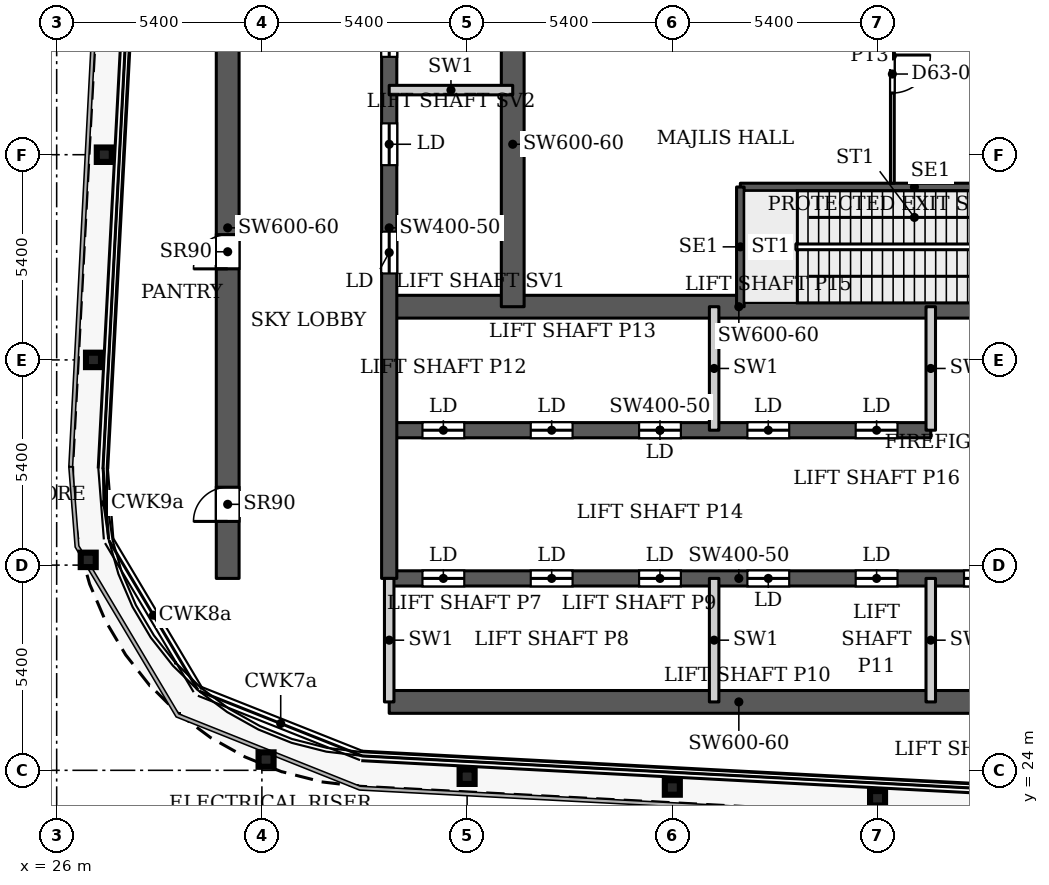
"""IFC4 building model, lengths in metres.
Left out: names, types, materials, properties, quantities, classifications, styles, units other than length and angle.
Written with IfcOpenShell. Run it as: python <this file> out.ifc"""

import sys

from ifc_helpers import new_model, si_unit, direction, frame, frame_2d, origin, origin_2d, place, context, subcontext, project, spatial, rectangle, i_section, extrude, source, transform, mapped, element, fill, save


model = new_model("IFC4")
c1 = context("Model", 3, precision=1e-05, world=origin(), true_north=direction((0.0, 1.0)))
c2 = subcontext(c1, "Body", "Model", "MODEL_VIEW")
j1 = project(units=[si_unit("LENGTHUNIT", "METRE"), si_unit("PLANEANGLEUNIT", "RADIAN")], contexts=[c1])
p1 = place(None, origin())
s1 = spatial("IfcSite", under=j1, at=p1, CompositionType="ELEMENT")
p2 = place(p1, origin())
s2 = spatial("IfcBuilding", under=s1, at=p2, CompositionType="ELEMENT")
p3 = place(p2, frame((0.0, 0.0, 266.9)))
s3 = spatial("IfcBuildingStorey", under=s2, at=p3, CompositionType="ELEMENT", Elevation=266.9)
for number, where, z_axis, x_axis in (
    (1, (47.6, 23.264, 0.0), (0.0, 0.0, 1.0), (1.0, 0.0, 0.0)),
    (2, (42.2, 23.548, 0.0), (0.0, 0.0, 1.0), (1.0, 0.0, 0.0)),
    (3, (36.8, 23.832, 0.0), (0.0, 0.0, 1.0), (1.0, 0.0, 0.0)),
    (4, (31.51, 24.283, 0.0), (0.0, 0.0, 1.0), (1.0, 0.0, 0.0)),
    (5, (26.83, 29.538, 0.0), (0.0, 0.0, 1.0), (1.0, 0.0, 0.0)),
    (6, (26.969, 34.8, 0.0), (0.0, 0.0, 1.0), (1.0, 0.0, 0.0)),
    (7, (27.253, 40.2, 0.0), (0.0, 0.0, 1.0), (1.0, 0.0, 0.0)),
):
    element("IfcColumn", number, at=place(p3, frame(where, z_axis=z_axis, x_axis=x_axis)), inside=s3, PredefinedType="COLUMN", context=c2, shape_type="SweptSolid", body=[
        extrude(i_section(OverallWidth=0.395, OverallDepth=0.38, WebThickness=0.019, FlangeThickness=0.03, FilletRadius=0.011, at=origin_2d()), origin(), (0.0, 0.0, 1.0), 7.8),
    ])
p4 = place(p3, frame((34.75, 25.8, 0.0), z_axis=(0.0, 0.0, 1.0), x_axis=(1.0, 0.0, 0.0)))
e8 = element("IfcWall", 8, at=p4, inside=s3, PredefinedType="SHEAR", context=c2, shape_type="SweptSolid", body=[
    extrude(rectangle(XDim=18.4, YDim=0.6, at=frame_2d((9.2, 0.0))), origin(), (0.0, 0.0, 1.0), 7.8),
])
p5 = place(p3, frame((34.75, 29.05, 0.0), z_axis=(0.0, 0.0, 1.0), x_axis=(1.0, 0.0, 0.0)))
e9 = element("IfcWall", 9, at=p5, inside=s3, PredefinedType="SHEAR", context=c2, shape_type="SweptSolid", body=[
    extrude(rectangle(XDim=18.4, YDim=0.4, at=frame_2d((9.2, 0.0))), origin(), (0.0, 0.0, 1.0), 7.8),
])
p6 = place(p5, frame((0.875, 0.0, 0.0)))
e10 = element("IfcOpeningElement", 10, at=p6, cuts=e9, PredefinedType="OPENING", context=c2, shape_type="SweptSolid", body=[
    extrude(rectangle(XDim=1.1, YDim=2.2, at=frame_2d((0.55, 1.1))), frame((0.0, 0.21, 0.0), z_axis=(0.0, -1.0, 0.0), x_axis=(1.0, 0.0, 0.0)), (0.0, 0.0, 1.0), 0.42),
])
p7 = place(p5, frame((3.725, 0.0, 0.0)))
e11 = element("IfcOpeningElement", 11, at=p7, cuts=e9, PredefinedType="OPENING", context=c2, shape_type="SweptSolid", body=[
    extrude(rectangle(XDim=1.1, YDim=2.2, at=frame_2d((0.55, 1.1))), frame((0.0, 0.21, 0.0), z_axis=(0.0, -1.0, 0.0), x_axis=(1.0, 0.0, 0.0)), (0.0, 0.0, 1.0), 0.42),
])
p8 = place(p5, frame((6.575, 0.0, 0.0)))
e12 = element("IfcOpeningElement", 12, at=p8, cuts=e9, PredefinedType="OPENING", context=c2, shape_type="SweptSolid", body=[
    extrude(rectangle(XDim=1.1, YDim=2.2, at=frame_2d((0.55, 1.1))), frame((0.0, 0.21, 0.0), z_axis=(0.0, -1.0, 0.0), x_axis=(1.0, 0.0, 0.0)), (0.0, 0.0, 1.0), 0.42),
])
p9 = place(p5, frame((9.425, 0.0, 0.0)))
e13 = element("IfcOpeningElement", 13, at=p9, cuts=e9, PredefinedType="OPENING", context=c2, shape_type="SweptSolid", body=[
    extrude(rectangle(XDim=1.1, YDim=2.2, at=frame_2d((0.55, 1.1))), frame((0.0, 0.21, 0.0), z_axis=(0.0, -1.0, 0.0), x_axis=(1.0, 0.0, 0.0)), (0.0, 0.0, 1.0), 0.42),
])
p10 = place(p5, frame((12.275, 0.0, 0.0)))
e14 = element("IfcOpeningElement", 14, at=p10, cuts=e9, PredefinedType="OPENING", context=c2, shape_type="SweptSolid", body=[
    extrude(rectangle(XDim=1.1, YDim=2.2, at=frame_2d((0.55, 1.1))), frame((0.0, 0.21, 0.0), z_axis=(0.0, -1.0, 0.0), x_axis=(1.0, 0.0, 0.0)), (0.0, 0.0, 1.0), 0.42),
])
p11 = place(p5, frame((15.125, 0.0, 0.0)))
e15 = element("IfcOpeningElement", 15, at=p11, cuts=e9, PredefinedType="OPENING", context=c2, shape_type="SweptSolid", body=[
    extrude(rectangle(XDim=1.1, YDim=2.2, at=frame_2d((0.55, 1.1))), frame((0.0, 0.21, 0.0), z_axis=(0.0, -1.0, 0.0), x_axis=(1.0, 0.0, 0.0)), (0.0, 0.0, 1.0), 0.42),
])
p12 = place(p3, frame((34.75, 32.95, 0.0), z_axis=(0.0, 0.0, 1.0), x_axis=(1.0, 0.0, 0.0)))
e16 = element("IfcWall", 16, at=p12, inside=s3, PredefinedType="SHEAR", context=c2, shape_type="SweptSolid", body=[
    extrude(rectangle(XDim=14.25, YDim=0.4, at=frame_2d((7.125, 0.0))), origin(), (0.0, 0.0, 1.0), 7.8),
])
p13 = place(p12, frame((0.875, 0.0, 0.0)))
e17 = element("IfcOpeningElement", 17, at=p13, cuts=e16, PredefinedType="OPENING", context=c2, shape_type="SweptSolid", body=[
    extrude(rectangle(XDim=1.1, YDim=2.2, at=frame_2d((0.55, 1.1))), frame((0.0, 0.21, 0.0), z_axis=(0.0, -1.0, 0.0), x_axis=(1.0, 0.0, 0.0)), (0.0, 0.0, 1.0), 0.42),
])
p14 = place(p12, frame((3.725, 0.0, 0.0)))
e18 = element("IfcOpeningElement", 18, at=p14, cuts=e16, PredefinedType="OPENING", context=c2, shape_type="SweptSolid", body=[
    extrude(rectangle(XDim=1.1, YDim=2.2, at=frame_2d((0.55, 1.1))), frame((0.0, 0.21, 0.0), z_axis=(0.0, -1.0, 0.0), x_axis=(1.0, 0.0, 0.0)), (0.0, 0.0, 1.0), 0.42),
])
p15 = place(p12, frame((6.575, 0.0, 0.0)))
e19 = element("IfcOpeningElement", 19, at=p15, cuts=e16, PredefinedType="OPENING", context=c2, shape_type="SweptSolid", body=[
    extrude(rectangle(XDim=1.1, YDim=2.2, at=frame_2d((0.55, 1.1))), frame((0.0, 0.21, 0.0), z_axis=(0.0, -1.0, 0.0), x_axis=(1.0, 0.0, 0.0)), (0.0, 0.0, 1.0), 0.42),
])
p16 = place(p12, frame((9.425, 0.0, 0.0)))
e20 = element("IfcOpeningElement", 20, at=p16, cuts=e16, PredefinedType="OPENING", context=c2, shape_type="SweptSolid", body=[
    extrude(rectangle(XDim=1.1, YDim=2.2, at=frame_2d((0.55, 1.1))), frame((0.0, 0.21, 0.0), z_axis=(0.0, -1.0, 0.0), x_axis=(1.0, 0.0, 0.0)), (0.0, 0.0, 1.0), 0.42),
])
p17 = place(p12, frame((12.275, 0.0, 0.0)))
e21 = element("IfcOpeningElement", 21, at=p17, cuts=e16, PredefinedType="OPENING", context=c2, shape_type="SweptSolid", body=[
    extrude(rectangle(XDim=1.1, YDim=2.2, at=frame_2d((0.55, 1.1))), frame((0.0, 0.21, 0.0), z_axis=(0.0, -1.0, 0.0), x_axis=(1.0, 0.0, 0.0)), (0.0, 0.0, 1.0), 0.42),
])
p18 = place(p3, frame((34.75, 36.2, 0.0), z_axis=(0.0, 0.0, 1.0), x_axis=(1.0, 0.0, 0.0)))
e22 = element("IfcWall", 22, at=p18, inside=s3, PredefinedType="SHEAR", context=c2, shape_type="SweptSolid", body=[
    extrude(rectangle(XDim=18.4, YDim=0.6, at=frame_2d((9.2, 0.0))), origin(), (0.0, 0.0, 1.0), 7.8),
])
p19 = place(p18, frame((16.9, 0.0, 0.0)))
e23 = element("IfcOpeningElement", 23, at=p19, cuts=e22, PredefinedType="OPENING", context=c2, shape_type="SweptSolid", body=[
    extrude(rectangle(XDim=1.0, YDim=2.2, at=frame_2d((0.5, 1.1))), frame((0.0, 0.31, 0.0), z_axis=(0.0, -1.0, 0.0), x_axis=(1.0, 0.0, 0.0)), (0.0, 0.0, 1.0), 0.62),
])
p20 = place(p3, frame((34.75, 29.05, 0.0), z_axis=(0.0, 0.0, 1.0), x_axis=(0.0, 1.0, 0.0)))
e24 = element("IfcWall", 24, at=p20, inside=s3, PredefinedType="SHEAR", context=c2, shape_type="SweptSolid", body=[
    extrude(rectangle(XDim=18.45, YDim=0.4, at=frame_2d((9.225, 0.0))), origin(), (0.0, 0.0, 1.0), 7.8),
])
p21 = place(p20, frame((8.025, 0.0, 0.0)))
e25 = element("IfcOpeningElement", 25, at=p21, cuts=e24, PredefinedType="OPENING", context=c2, shape_type="SweptSolid", body=[
    extrude(rectangle(XDim=1.1, YDim=2.2, at=frame_2d((0.55, 1.1))), frame((0.0, 0.21, 0.0), z_axis=(0.0, -1.0, 0.0), x_axis=(1.0, 0.0, 0.0)), (0.0, 0.0, 1.0), 0.42),
])
p22 = place(p20, frame((10.875, 0.0, 0.0)))
e26 = element("IfcOpeningElement", 26, at=p22, cuts=e24, PredefinedType="OPENING", context=c2, shape_type="SweptSolid", body=[
    extrude(rectangle(XDim=1.1, YDim=2.2, at=frame_2d((0.55, 1.1))), frame((0.0, 0.21, 0.0), z_axis=(0.0, -1.0, 0.0), x_axis=(1.0, 0.0, 0.0)), (0.0, 0.0, 1.0), 0.42),
])
p23 = place(p20, frame((13.725, 0.0, 0.0)))
e27 = element("IfcOpeningElement", 27, at=p23, cuts=e24, PredefinedType="OPENING", context=c2, shape_type="SweptSolid", body=[
    extrude(rectangle(XDim=1.1, YDim=2.2, at=frame_2d((0.55, 1.1))), frame((0.0, 0.21, 0.0), z_axis=(0.0, -1.0, 0.0), x_axis=(1.0, 0.0, 0.0)), (0.0, 0.0, 1.0), 0.42),
])
p24 = place(p20, frame((15.95, 0.0, 0.0)))
e28 = element("IfcOpeningElement", 28, at=p24, cuts=e24, PredefinedType="OPENING", context=c2, shape_type="SweptSolid", body=[
    extrude(rectangle(XDim=1.1, YDim=2.2, at=frame_2d((0.55, 1.1))), frame((0.0, 0.21, 0.0), z_axis=(0.0, -1.0, 0.0), x_axis=(1.0, 0.0, 0.0)), (0.0, 0.0, 1.0), 0.42),
])
p25 = place(p3, frame((38.0, 36.2, 0.0), z_axis=(0.0, 0.0, 1.0), x_axis=(0.0, 1.0, 0.0)))
e29 = element("IfcWall", 29, at=p25, inside=s3, PredefinedType="SHEAR", context=c2, shape_type="SweptSolid", body=[
    extrude(rectangle(XDim=8.55, YDim=0.6, at=frame_2d((4.275, 0.0))), origin(), (0.0, 0.0, 1.0), 7.8),
])
p26 = place(p3, frame((30.5, 29.05, 0.0), z_axis=(0.0, 0.0, 1.0), x_axis=(0.0, 1.0, 0.0)))
e30 = element("IfcWall", 30, at=p26, inside=s3, PredefinedType="SHEAR", context=c2, shape_type="SweptSolid", body=[
    extrude(rectangle(XDim=18.45, YDim=0.6, at=frame_2d((9.225, 0.0))), origin(), (0.0, 0.0, 1.0), 7.8),
])
p27 = place(p26, frame((1.5, 0.0, 0.0)))
e31 = element("IfcOpeningElement", 31, at=p27, cuts=e30, PredefinedType="OPENING", context=c2, shape_type="SweptSolid", body=[
    extrude(rectangle(XDim=0.9, YDim=2.2, at=frame_2d((0.45, 1.1))), frame((0.0, 0.31, 0.0), z_axis=(0.0, -1.0, 0.0), x_axis=(1.0, 0.0, 0.0)), (0.0, 0.0, 1.0), 0.62),
])
p28 = place(p26, frame((8.146, 0.0, 0.0)))
e32 = element("IfcOpeningElement", 32, at=p28, cuts=e30, PredefinedType="OPENING", context=c2, shape_type="SweptSolid", body=[
    extrude(rectangle(XDim=0.9, YDim=2.2, at=frame_2d((0.45, 1.1))), frame((0.0, 0.31, 0.0), z_axis=(0.0, -1.0, 0.0), x_axis=(1.0, 0.0, 0.0)), (0.0, 0.0, 1.0), 0.62),
])
p29 = place(p3, frame((43.99, 39.35, 0.0), z_axis=(0.0, 0.0, 1.0), x_axis=(1.0, 0.0, 0.0)))
e33 = element("IfcWall", 33, at=p29, inside=s3, PredefinedType="SHEAR", context=c2, shape_type="SweptSolid", body=[
    extrude(rectangle(XDim=9.16, YDim=0.2, at=frame_2d((4.58, 0.0))), origin(), (0.0, 0.0, 1.0), 7.8),
])
p30 = place(p3, frame((43.99, 36.2, 0.0), z_axis=(0.0, 0.0, 1.0), x_axis=(0.0, 1.0, 0.0)))
e34 = element("IfcWall", 34, at=p30, inside=s3, PredefinedType="SHEAR", context=c2, shape_type="SweptSolid", body=[
    extrude(rectangle(XDim=3.15, YDim=0.2, at=frame_2d((1.575, 0.0))), origin(), (0.0, 0.0, 1.0), 7.8),
])
for number, where, z_axis, x_axis in (
    (35, (34.75, 25.8, 0.0), (0.0, 0.0, 1.0), (0.0, 1.0, 0.0)),
    (36, (43.3, 25.8, 0.0), (0.0, 0.0, 1.0), (0.0, 1.0, 0.0)),
    (37, (43.3, 32.95, 0.0), (0.0, 0.0, 1.0), (0.0, 1.0, 0.0)),
    (38, (49.0, 25.8, 0.0), (0.0, 0.0, 1.0), (0.0, 1.0, 0.0)),
    (39, (49.0, 32.95, 0.0), (0.0, 0.0, 1.0), (0.0, 1.0, 0.0)),
    (40, (34.75, 41.9, 0.0), (0.0, 0.0, 1.0), (1.0, 0.0, 0.0)),
):
    element("IfcWall", number, at=place(p3, frame(where, z_axis=z_axis, x_axis=x_axis)), inside=s3, PredefinedType="PARTITIONING", context=c2, shape_type="SweptSolid", body=[
        extrude(rectangle(XDim=3.25, YDim=0.25, at=frame_2d((1.625, 0.0))), origin(), (0.0, 0.0, 1.0), 7.8),
    ])
p31 = place(p3, frame((47.99, 39.449, 0.0), z_axis=(0.0, 0.0, 1.0), x_axis=(0.0, 1.0, 0.0)))
e41 = element("IfcWall", 41, at=p31, inside=s3, PredefinedType="PARTITIONING", context=c2, shape_type="SweptSolid", body=[
    extrude(rectangle(XDim=6.701, YDim=0.1, at=frame_2d((3.351, 0.0))), origin(), (0.0, 0.0, 1.0), 7.5),
])
p32 = place(p31, frame((2.374, 0.0, 0.0)))
e42 = element("IfcOpeningElement", 42, at=p32, cuts=e41, PredefinedType="OPENING", context=c2, shape_type="SweptSolid", body=[
    extrude(rectangle(XDim=1.0, YDim=2.1, at=frame_2d((0.5, 1.05))), frame((0.0, 0.06, 0.0), z_axis=(0.0, -1.0, 0.0), x_axis=(1.0, 0.0, 0.0)), (0.0, 0.0, 1.0), 0.12),
])
m1 = source(origin(), c2, "Body", "SweptSolid", [
    extrude(rectangle(XDim=1.1, YDim=2.2, at=frame_2d((0.55, 1.1))), frame((0.0, 0.025, 0.0), z_axis=(0.0, -1.0, 0.0), x_axis=(1.0, 0.0, 0.0)), (0.0, 0.0, 1.0), 0.05),
])
p33 = place(p6, origin())
e43 = element("IfcDoor", 43, at=p33, inside=s3, OperationType="SLIDING_TO_LEFT", PredefinedType="DOOR", context=c2, shape_type="MappedRepresentation", body=[
    mapped(m1, transform((0.0, 0.0, 0.0), x_axis=(1.0, 0.0, 0.0), y_axis=(0.0, 1.0, 0.0), z_axis=(0.0, 0.0, 1.0), scale=1.0)),
])
fill(e10, e43)
p34 = place(p7, origin())
e44 = element("IfcDoor", 44, at=p34, inside=s3, OperationType="SLIDING_TO_LEFT", PredefinedType="DOOR", context=c2, shape_type="MappedRepresentation", body=[
    mapped(m1, transform((0.0, 0.0, 0.0), x_axis=(1.0, 0.0, 0.0), y_axis=(0.0, 1.0, 0.0), z_axis=(0.0, 0.0, 1.0), scale=1.0)),
])
fill(e11, e44)
p35 = place(p8, origin())
e45 = element("IfcDoor", 45, at=p35, inside=s3, OperationType="SLIDING_TO_LEFT", PredefinedType="DOOR", context=c2, shape_type="MappedRepresentation", body=[
    mapped(m1, transform((0.0, 0.0, 0.0), x_axis=(1.0, 0.0, 0.0), y_axis=(0.0, 1.0, 0.0), z_axis=(0.0, 0.0, 1.0), scale=1.0)),
])
fill(e12, e45)
p36 = place(p9, origin())
e46 = element("IfcDoor", 46, at=p36, inside=s3, OperationType="SLIDING_TO_LEFT", PredefinedType="DOOR", context=c2, shape_type="MappedRepresentation", body=[
    mapped(m1, transform((0.0, 0.0, 0.0), x_axis=(1.0, 0.0, 0.0), y_axis=(0.0, 1.0, 0.0), z_axis=(0.0, 0.0, 1.0), scale=1.0)),
])
fill(e13, e46)
p37 = place(p10, origin())
e47 = element("IfcDoor", 47, at=p37, inside=s3, OperationType="SLIDING_TO_LEFT", PredefinedType="DOOR", context=c2, shape_type="MappedRepresentation", body=[
    mapped(m1, transform((0.0, 0.0, 0.0), x_axis=(1.0, 0.0, 0.0), y_axis=(0.0, 1.0, 0.0), z_axis=(0.0, 0.0, 1.0), scale=1.0)),
])
fill(e14, e47)
p38 = place(p13, origin())
e48 = element("IfcDoor", 48, at=p38, inside=s3, OperationType="SLIDING_TO_LEFT", PredefinedType="DOOR", context=c2, shape_type="MappedRepresentation", body=[
    mapped(m1, transform((0.0, 0.0, 0.0), x_axis=(1.0, 0.0, 0.0), y_axis=(0.0, 1.0, 0.0), z_axis=(0.0, 0.0, 1.0), scale=1.0)),
])
fill(e17, e48)
p39 = place(p14, origin())
e49 = element("IfcDoor", 49, at=p39, inside=s3, OperationType="SLIDING_TO_LEFT", PredefinedType="DOOR", context=c2, shape_type="MappedRepresentation", body=[
    mapped(m1, transform((0.0, 0.0, 0.0), x_axis=(1.0, 0.0, 0.0), y_axis=(0.0, 1.0, 0.0), z_axis=(0.0, 0.0, 1.0), scale=1.0)),
])
fill(e18, e49)
p40 = place(p15, origin())
e50 = element("IfcDoor", 50, at=p40, inside=s3, OperationType="SLIDING_TO_LEFT", PredefinedType="DOOR", context=c2, shape_type="MappedRepresentation", body=[
    mapped(m1, transform((0.0, 0.0, 0.0), x_axis=(1.0, 0.0, 0.0), y_axis=(0.0, 1.0, 0.0), z_axis=(0.0, 0.0, 1.0), scale=1.0)),
])
fill(e19, e50)
p41 = place(p16, origin())
e51 = element("IfcDoor", 51, at=p41, inside=s3, OperationType="SLIDING_TO_LEFT", PredefinedType="DOOR", context=c2, shape_type="MappedRepresentation", body=[
    mapped(m1, transform((0.0, 0.0, 0.0), x_axis=(1.0, 0.0, 0.0), y_axis=(0.0, 1.0, 0.0), z_axis=(0.0, 0.0, 1.0), scale=1.0)),
])
fill(e20, e51)
p42 = place(p17, origin())
e52 = element("IfcDoor", 52, at=p42, inside=s3, OperationType="SLIDING_TO_LEFT", PredefinedType="DOOR", context=c2, shape_type="MappedRepresentation", body=[
    mapped(m1, transform((0.0, 0.0, 0.0), x_axis=(1.0, 0.0, 0.0), y_axis=(0.0, 1.0, 0.0), z_axis=(0.0, 0.0, 1.0), scale=1.0)),
])
fill(e21, e52)
p43 = place(p21, origin())
e53 = element("IfcDoor", 53, at=p43, inside=s3, OperationType="SLIDING_TO_LEFT", PredefinedType="DOOR", context=c2, shape_type="MappedRepresentation", body=[
    mapped(m1, transform((0.0, 0.0, 0.0), x_axis=(1.0, 0.0, 0.0), y_axis=(0.0, 1.0, 0.0), z_axis=(0.0, 0.0, 1.0), scale=1.0)),
])
fill(e25, e53)
p44 = place(p22, origin())
e54 = element("IfcDoor", 54, at=p44, inside=s3, OperationType="SLIDING_TO_LEFT", PredefinedType="DOOR", context=c2, shape_type="MappedRepresentation", body=[
    mapped(m1, transform((0.0, 0.0, 0.0), x_axis=(1.0, 0.0, 0.0), y_axis=(0.0, 1.0, 0.0), z_axis=(0.0, 0.0, 1.0), scale=1.0)),
])
fill(e26, e54)
p45 = place(p23, origin())
e55 = element("IfcDoor", 55, at=p45, inside=s3, OperationType="SLIDING_TO_LEFT", PredefinedType="DOOR", context=c2, shape_type="MappedRepresentation", body=[
    mapped(m1, transform((0.0, 0.0, 0.0), x_axis=(1.0, 0.0, 0.0), y_axis=(0.0, 1.0, 0.0), z_axis=(0.0, 0.0, 1.0), scale=1.0)),
])
fill(e27, e55)
p46 = place(p11, origin())
e56 = element("IfcDoor", 56, at=p46, inside=s3, OperationType="SLIDING_TO_LEFT", PredefinedType="DOOR", context=c2, shape_type="MappedRepresentation", body=[
    mapped(m1, transform((0.0, 0.0, 0.0), x_axis=(1.0, 0.0, 0.0), y_axis=(0.0, 1.0, 0.0), z_axis=(0.0, 0.0, 1.0), scale=1.0)),
])
fill(e15, e56)
m2 = source(origin(), c2, "Body", "SweptSolid", [
    extrude(rectangle(XDim=0.9, YDim=2.2, at=frame_2d((0.45, 1.1))), frame((0.0, 0.025, 0.0), z_axis=(0.0, -1.0, 0.0), x_axis=(1.0, 0.0, 0.0)), (0.0, 0.0, 1.0), 0.05),
])
p47 = place(p27, origin())
e57 = element("IfcDoor", 57, at=p47, inside=s3, OperationType="SINGLE_SWING_LEFT", PredefinedType="DOOR", context=c2, shape_type="MappedRepresentation", body=[
    mapped(m2, transform((0.0, 0.0, 0.0), x_axis=(1.0, 0.0, 0.0), y_axis=(0.0, 1.0, 0.0), z_axis=(0.0, 0.0, 1.0), scale=1.0)),
])
fill(e31, e57)
p48 = place(p28, origin())
e58 = element("IfcDoor", 58, at=p48, inside=s3, OperationType="SINGLE_SWING_LEFT", PredefinedType="DOOR", context=c2, shape_type="MappedRepresentation", body=[
    mapped(m2, transform((0.0, 0.0, 0.0), x_axis=(1.0, 0.0, 0.0), y_axis=(0.0, 1.0, 0.0), z_axis=(0.0, 0.0, 1.0), scale=1.0)),
])
fill(e32, e58)
m3 = source(origin(), c2, "Body", "SweptSolid", [
    extrude(rectangle(XDim=1.0, YDim=2.1, at=frame_2d((0.5, 1.05))), frame((0.0, 0.025, 0.0), z_axis=(0.0, -1.0, 0.0), x_axis=(1.0, 0.0, 0.0)), (0.0, 0.0, 1.0), 0.05),
])
p49 = place(p32, origin())
e59 = element("IfcDoor", 59, at=p49, inside=s3, OperationType="SINGLE_SWING_RIGHT", PredefinedType="DOOR", context=c2, shape_type="MappedRepresentation", body=[
    mapped(m3, transform((0.0, 0.0, 0.0), x_axis=(1.0, 0.0, 0.0), y_axis=(0.0, 1.0, 0.0), z_axis=(0.0, 0.0, 1.0), scale=1.0)),
])
fill(e42, e59)
save(model, sys.argv[1])
